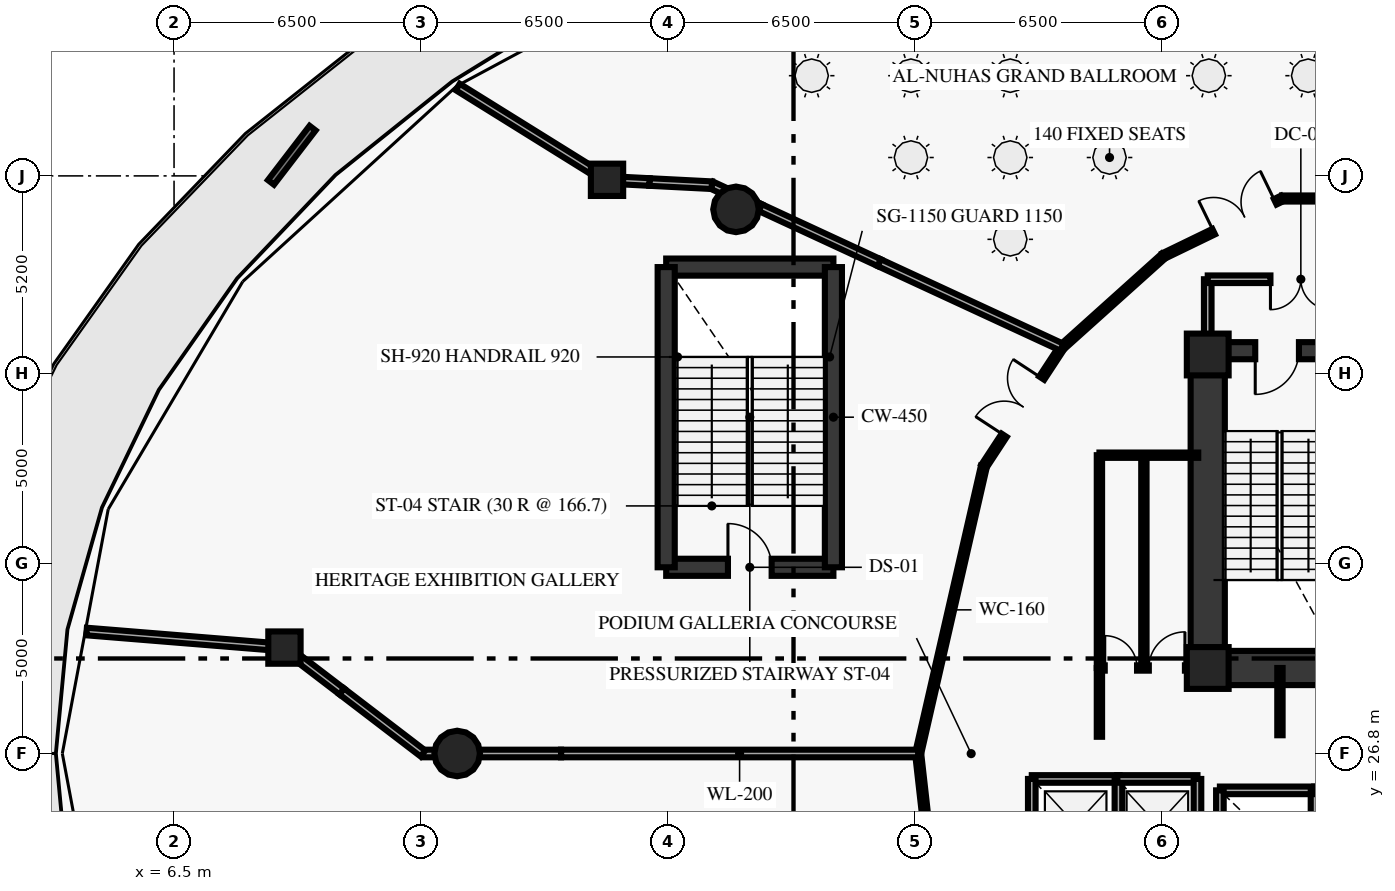
"""IFC4 building model, lengths in metres.
Left out: names, types, materials, properties, quantities, classifications, styles, units other than length and angle.
Written with IfcOpenShell. Run it as: python <this file> out.ifc"""

import sys

from ifc_helpers import new_model, si_unit, direction, frame, frame_2d, origin, origin_2d, place, context, subcontext, project, spatial, rectangle, circle, extrude, element, fill, save


model = new_model("IFC4")
c1 = context("Model", 3, precision=1e-05, world=origin(), true_north=direction((0.0, 1.0)))
c2 = subcontext(c1, "Body", "Model", "MODEL_VIEW")
j1 = project(units=[si_unit("LENGTHUNIT", "METRE"), si_unit("PLANEANGLEUNIT", "RADIAN")], contexts=[c1])
p1 = place(None, origin())
s1 = spatial("IfcSite", under=j1, at=p1, CompositionType="ELEMENT")
p2 = place(p1, origin())
s2 = spatial("IfcBuilding", under=s1, at=p2, CompositionType="ELEMENT")
p3 = place(p2, frame((0.0, 0.0, 11.0)))
s3 = spatial("IfcBuildingStorey", under=s2, at=p3, CompositionType="ELEMENT", Elevation=11.0)
for number, where, z_axis, x_axis in (
    (1, (33.7, 37.3, 0.0), (0.0, 0.0, 1.0), (1.0, 0.0, 0.0)),
    (2, (33.7, 29.05, 0.0), (0.0, 0.0, 1.0), (1.0, 0.0, 0.0)),
):
    element("IfcColumn", number, at=place(p3, frame(where, z_axis=z_axis, x_axis=x_axis)), inside=s3, PredefinedType="PILASTER", context=c2, shape_type="SweptSolid", body=[
        extrude(rectangle(XDim=1.1, YDim=1.1, at=origin_2d()), origin(), (0.0, 0.0, 1.0), 4.7),
    ])
for number, where, z_axis, x_axis in (
    (3, (21.287, 41.119, 0.0), (0.0, 0.0, 1.0), (1.0, 0.0, 0.0)),
    (4, (13.95, 26.8, 0.0), (0.0, 0.0, 1.0), (1.0, 0.0, 0.0)),
):
    element("IfcColumn", number, at=place(p3, frame(where, z_axis=z_axis, x_axis=x_axis)), inside=s3, PredefinedType="COLUMN", context=c2, shape_type="SweptSolid", body=[
        extrude(circle(Radius=0.6, at=origin_2d()), origin(), (0.0, 0.0, 1.0), 4.7),
    ])
for number, where, z_axis, x_axis in (
    (5, (17.893, 41.897, 0.0), (0.0, 0.0, 1.0), (1.0, 0.0, 0.0)),
    (6, (9.405, 29.587, 0.0), (0.0, 0.0, 1.0), (1.0, 0.0, 0.0)),
):
    element("IfcColumn", number, at=place(p3, frame(where, z_axis=z_axis, x_axis=x_axis)), inside=s3, PredefinedType="COLUMN", context=c2, shape_type="SweptSolid", body=[
        extrude(rectangle(XDim=0.85, YDim=0.85, at=origin_2d()), origin(), (0.0, 0.0, 1.0), 4.7),
    ])
p4 = place(p3, frame((33.7, 29.05, 0.0), z_axis=(0.0, 0.0, 1.0), x_axis=(0.0, 1.0, 0.0)))
e7 = element("IfcWall", 7, at=p4, inside=s3, PredefinedType="SHEAR", context=c2, shape_type="SweptSolid", body=[
    extrude(rectangle(XDim=8.35, YDim=0.9, at=frame_2d((4.175, 0.0))), origin(), (0.0, 0.0, 1.0), 4.7),
])
p5 = place(p3, frame((33.7, 29.05, 0.0), z_axis=(0.0, 0.0, 1.0), x_axis=(1.0, 0.0, 0.0)))
e8 = element("IfcWall", 8, at=p5, inside=s3, PredefinedType="SHEAR", context=c2, shape_type="SweptSolid", body=[
    extrude(rectangle(XDim=10.6, YDim=0.9, at=frame_2d((5.3, 0.0))), origin(), (0.0, 0.0, 1.0), 4.7),
])
p6 = place(p3, frame((9.05, 41.829, 0.0), z_axis=(0.0, 0.0, 1.0), x_axis=(0.608838635348, 0.793294091814, 0.0)))
e9 = element("IfcWall", 9, at=p6, inside=s3, PredefinedType="ELEMENTEDWALL", context=c2, shape_type="SweptSolid", body=[
    extrude(rectangle(XDim=1.8, YDim=0.2, at=frame_2d((0.9, 0.0))), origin(), (0.0, 0.0, 1.0), 0.65),
])
p7 = place(p3, frame((37.35, 37.4, 0.0), z_axis=(0.0, 0.0, 1.0), x_axis=(-1.0, 0.0, 0.0)))
e10 = element("IfcWall", 10, at=p7, inside=s3, PredefinedType="SHEAR", context=c2, shape_type="SweptSolid", body=[
    extrude(rectangle(XDim=3.65, YDim=0.45, at=frame_2d((1.825, 0.0))), origin(), (0.0, 0.0, 1.0), 4.7),
])
p8 = place(p7, frame((1.25, 0.0, 0.0)))
e11 = element("IfcOpeningElement", 11, at=p8, cuts=e10, PredefinedType="OPENING", context=c2, shape_type="SweptSolid", body=[
    extrude(rectangle(XDim=1.15, YDim=2.15, at=frame_2d((0.575, 1.075))), frame((0.0, 0.235, 0.0), z_axis=(0.0, -1.0, 0.0), x_axis=(1.0, 0.0, 0.0)), (0.0, 0.0, 1.0), 0.47),
])
p9 = place(p3, frame((19.45, 31.7, 0.0), z_axis=(0.0, 0.0, 1.0), x_axis=(1.0, 0.0, 0.0)))
e12 = element("IfcWall", 12, at=p9, inside=s3, PredefinedType="SHEAR", context=c2, shape_type="SweptSolid", body=[
    extrude(rectangle(XDim=4.4, YDim=0.45, at=frame_2d((2.2, 0.0))), origin(), (0.0, 0.0, 1.0), 4.7),
])
p10 = place(p9, frame((1.625, 0.0, 0.0)))
e13 = element("IfcOpeningElement", 13, at=p10, cuts=e12, PredefinedType="OPENING", context=c2, shape_type="SweptSolid", body=[
    extrude(rectangle(XDim=1.15, YDim=2.15, at=frame_2d((0.575, 1.075))), frame((0.0, 0.235, 0.0), z_axis=(0.0, -1.0, 0.0), x_axis=(1.0, 0.0, 0.0)), (0.0, 0.0, 1.0), 0.47),
])
p11 = place(p3, frame((19.45, 39.6, 0.0), z_axis=(0.0, 0.0, 1.0), x_axis=(1.0, 0.0, 0.0)))
e14 = element("IfcWall", 14, at=p11, inside=s3, PredefinedType="SHEAR", context=c2, shape_type="SweptSolid", body=[
    extrude(rectangle(XDim=4.4, YDim=0.45, at=frame_2d((2.2, 0.0))), origin(), (0.0, 0.0, 1.0), 4.7),
])
for number, where, z_axis, x_axis in (
    (15, (19.45, 31.7, 0.0), (0.0, 0.0, 1.0), (0.0, 1.0, 0.0)),
    (16, (23.85, 31.7, 0.0), (0.0, 0.0, 1.0), (0.0, 1.0, 0.0)),
):
    element("IfcWall", number, at=place(p3, frame(where, z_axis=z_axis, x_axis=x_axis)), inside=s3, PredefinedType="SHEAR", context=c2, shape_type="SweptSolid", body=[
        extrude(rectangle(XDim=7.9, YDim=0.45, at=frame_2d((3.95, 0.0))), origin(), (0.0, 0.0, 1.0), 4.7),
    ])
p12 = place(p3, frame((33.7, 37.4, 0.0), z_axis=(0.0, 0.0, 1.0), x_axis=(0.0, 1.0, 0.0)))
e17 = element("IfcWall", 17, at=p12, inside=s3, PredefinedType="SOLIDWALL", context=c2, shape_type="SweptSolid", body=[
    extrude(rectangle(XDim=1.88, YDim=0.2, at=frame_2d((0.94, 0.0))), origin(), (0.0, 0.0, 1.0), 4.7),
])
p13 = place(p3, frame((38.9, 39.28, 0.0), z_axis=(0.0, 0.0, 1.0), x_axis=(-1.0, 0.0, 0.0)))
e18 = element("IfcWall", 18, at=p13, inside=s3, PredefinedType="SOLIDWALL", context=c2, shape_type="SweptSolid", body=[
    extrude(rectangle(XDim=5.2, YDim=0.2, at=frame_2d((2.6, 0.0))), origin(), (0.0, 0.0, 1.0), 4.7),
])
p14 = place(p13, frame((1.95, 0.0, 0.0)))
e19 = element("IfcOpeningElement", 19, at=p14, cuts=e18, PredefinedType="OPENING", context=c2, shape_type="SweptSolid", body=[
    extrude(rectangle(XDim=1.6, YDim=2.2, at=frame_2d((0.8, 1.1))), frame((0.0, 0.11, 0.0), z_axis=(0.0, -1.0, 0.0), x_axis=(1.0, 0.0, 0.0)), (0.0, 0.0, 1.0), 0.22),
])
p15 = place(p3, frame((35.6, 27.28, 0.0), z_axis=(0.0, 0.0, 1.0), x_axis=(0.0, 1.0, 0.0)))
e20 = element("IfcWall", 20, at=p15, inside=s3, PredefinedType="PARTITIONING", context=c2, shape_type="SweptSolid", body=[
    extrude(rectangle(XDim=1.77, YDim=0.14, at=frame_2d((0.885, 0.0))), origin(), (0.0, 0.0, 1.0), 4.7),
])
p16 = place(p3, frame((29.07, 26.13, 0.0), z_axis=(0.0, 0.0, 1.0), x_axis=(1.0, 0.0, 0.0)))
e21 = element("IfcWall", 21, at=p16, inside=s3, PredefinedType="SOLIDWALL", context=c2, shape_type="SweptSolid", body=[
    extrude(rectangle(XDim=2.31, YDim=0.2, at=frame_2d((1.155, 0.0))), origin(), (0.0, 0.0, 1.0), 4.7),
])
for number, where, z_axis, x_axis in (
    (22, (29.07, 23.72, 0.0), (0.0, 0.0, 1.0), (0.0, 1.0, 0.0)),
    (23, (31.35, 23.72, 0.0), (0.0, 0.0, 1.0), (0.0, 1.0, 0.0)),
):
    element("IfcWall", number, at=place(p3, frame(where, z_axis=z_axis, x_axis=x_axis)), inside=s3, PredefinedType="SOLIDWALL", context=c2, shape_type="SweptSolid", body=[
        extrude(rectangle(XDim=2.41, YDim=0.2, at=frame_2d((1.205, 0.0))), origin(), (0.0, 0.0, 1.0), 4.7),
    ])
p17 = place(p3, frame((31.32, 26.13, 0.0), z_axis=(0.0, 0.0, 1.0), x_axis=(1.0, 0.0, 0.0)))
e24 = element("IfcWall", 24, at=p17, inside=s3, PredefinedType="SOLIDWALL", context=c2, shape_type="SweptSolid", body=[
    extrude(rectangle(XDim=2.11, YDim=0.2, at=frame_2d((1.055, 0.0))), origin(), (0.0, 0.0, 1.0), 4.7),
])
p18 = place(p3, frame((33.43, 23.72, 0.0), z_axis=(0.0, 0.0, 1.0), x_axis=(0.0, 1.0, 0.0)))
e25 = element("IfcWall", 25, at=p18, inside=s3, PredefinedType="SOLIDWALL", context=c2, shape_type="SweptSolid", body=[
    extrude(rectangle(XDim=2.41, YDim=0.2, at=frame_2d((1.205, 0.0))), origin(), (0.0, 0.0, 1.0), 4.7),
])
p19 = place(p3, frame((34.02, 25.83, 0.0), z_axis=(0.0, 0.0, 1.0), x_axis=(1.0, 0.0, 0.0)))
e26 = element("IfcWall", 26, at=p19, inside=s3, PredefinedType="SOLIDWALL", context=c2, shape_type="SweptSolid", body=[
    extrude(rectangle(XDim=2.5, YDim=0.2, at=frame_2d((1.25, 0.0))), origin(), (0.0, 0.0, 1.0), 4.7),
])
for number, where, z_axis, x_axis in (
    (27, (34.02, 23.42, 0.0), (0.0, 0.0, 1.0), (0.0, 1.0, 0.0)),
    (28, (36.51, 23.42, 0.0), (0.0, 0.0, 1.0), (0.0, 1.0, 0.0)),
):
    element("IfcWall", number, at=place(p3, frame(where, z_axis=z_axis, x_axis=x_axis)), inside=s3, PredefinedType="SOLIDWALL", context=c2, shape_type="SweptSolid", body=[
        extrude(rectangle(XDim=2.41, YDim=0.2, at=frame_2d((1.205, 0.0))), origin(), (0.0, 0.0, 1.0), 4.7),
    ])
p20 = place(p3, frame((36.5, 25.83, 0.0), z_axis=(0.0, 0.0, 1.0), x_axis=(1.0, 0.0, 0.0)))
e29 = element("IfcWall", 29, at=p20, inside=s3, PredefinedType="SOLIDWALL", context=c2, shape_type="SweptSolid", body=[
    extrude(rectangle(XDim=2.5, YDim=0.2, at=frame_2d((1.25, 0.0))), origin(), (0.0, 0.0, 1.0), 4.7),
])
p21 = place(p3, frame((30.85, 27.24, 0.0), z_axis=(0.0, 0.0, 1.0), x_axis=(0.0, 1.0, 0.0)))
e30 = element("IfcWall", 30, at=p21, inside=s3, PredefinedType="PARTITIONING", context=c2, shape_type="SweptSolid", body=[
    extrude(rectangle(XDim=1.81, YDim=0.14, at=frame_2d((0.905, 0.0))), origin(), (0.0, 0.0, 1.0), 4.7),
])
p22 = place(p3, frame((30.85, 29.05, 0.0), z_axis=(0.0, 0.0, 1.0), x_axis=(1.0, 0.0, 0.0)))
e31 = element("IfcWall", 31, at=p22, inside=s3, PredefinedType="PARTITIONING", context=c2, shape_type="SweptSolid", body=[
    extrude(rectangle(XDim=2.43, YDim=0.14, at=frame_2d((1.215, 0.0))), origin(), (0.0, 0.0, 1.0), 3.66),
])
p23 = place(p22, frame((0.14, 0.0, 0.0)))
e32 = element("IfcOpeningElement", 32, at=p23, cuts=e31, PredefinedType="OPENING", context=c2, shape_type="SweptSolid", body=[
    extrude(rectangle(XDim=0.85, YDim=2.1, at=frame_2d((0.425, 1.05))), frame((0.0, 0.08, 0.0), z_axis=(0.0, -1.0, 0.0), x_axis=(1.0, 0.0, 0.0)), (0.0, 0.0, 1.0), 0.16),
])
p24 = place(p22, frame((1.3, 0.0, 0.0)))
e33 = element("IfcOpeningElement", 33, at=p24, cuts=e31, PredefinedType="OPENING", context=c2, shape_type="SweptSolid", body=[
    extrude(rectangle(XDim=0.95, YDim=2.1, at=frame_2d((0.475, 1.05))), frame((0.0, 0.08, 0.0), z_axis=(0.0, -1.0, 0.0), x_axis=(1.0, 0.0, 0.0)), (0.0, 0.0, 1.0), 0.16),
])
p25 = place(p3, frame((32.02, 29.05, 0.0), z_axis=(0.0, 0.0, 1.0), x_axis=(0.0, 1.0, 0.0)))
e34 = element("IfcWall", 34, at=p25, inside=s3, PredefinedType="PARTITIONING", context=c2, shape_type="SweptSolid", body=[
    extrude(rectangle(XDim=5.6, YDim=0.14, at=frame_2d((2.8, 0.0))), origin(), (0.0, 0.0, 1.0), 4.7),
])
p26 = place(p3, frame((30.85, 34.65, 0.0), z_axis=(0.0, 0.0, 1.0), x_axis=(1.0, 0.0, 0.0)))
e35 = element("IfcWall", 35, at=p26, inside=s3, PredefinedType="PARTITIONING", context=c2, shape_type="SweptSolid", body=[
    extrude(rectangle(XDim=2.6, YDim=0.14, at=frame_2d((1.3, 0.0))), origin(), (0.0, 0.0, 1.0), 4.7),
])
p27 = place(p3, frame((30.85, 29.05, 0.0), z_axis=(0.0, 0.0, 1.0), x_axis=(0.0, 1.0, 0.0)))
e36 = element("IfcWall", 36, at=p27, inside=s3, PredefinedType="PARTITIONING", context=c2, shape_type="SweptSolid", body=[
    extrude(rectangle(XDim=5.6, YDim=0.14, at=frame_2d((2.8, 0.0))), origin(), (0.0, 0.0, 1.0), 4.7),
])
p28 = place(p3, frame((42.344, 41.405, 0.0), z_axis=(0.0, 0.0, 1.0), x_axis=(-1.0, 0.0, 0.0)))
e37 = element("IfcWall", 37, at=p28, inside=s3, PredefinedType="PARTITIONING", context=c2, shape_type="SweptSolid", body=[
    extrude(rectangle(XDim=6.688, YDim=0.16, at=frame_2d((3.344, 0.0))), origin(), (0.0, 0.0, 1.0), 4.7),
])
p29 = place(p3, frame((32.54, 39.894, 0.0), z_axis=(0.0, 0.0, 1.0), x_axis=(0.899789784655, 0.436323668199, 0.0)))
e38 = element("IfcWall", 38, at=p29, inside=s3, PredefinedType="PARTITIONING", context=c2, shape_type="SweptSolid", body=[
    extrude(rectangle(XDim=3.463, YDim=0.16, at=frame_2d((1.731, 0.0))), origin(), (0.0, 0.0, 1.0), 4.7),
])
p30 = place(p29, frame((1.463, 0.0, 0.0)))
e39 = element("IfcOpeningElement", 39, at=p30, cuts=e38, PredefinedType="OPENING", context=c2, shape_type="SweptSolid", body=[
    extrude(rectangle(XDim=1.8, YDim=2.3, at=frame_2d((0.9, 1.15))), frame((0.0, 0.09, 0.0), z_axis=(0.0, -1.0, 0.0), x_axis=(1.0, 0.0, 0.0)), (0.0, 0.0, 1.0), 0.18),
])
p31 = place(p3, frame((32.54, 39.894, 0.0), z_axis=(0.0, 0.0, 1.0), x_axis=(-0.744032872127, -0.668143012531, 0.0)))
e40 = element("IfcWall", 40, at=p31, inside=s3, PredefinedType="PARTITIONING", context=c2, shape_type="SweptSolid", body=[
    extrude(rectangle(XDim=3.597, YDim=0.16, at=frame_2d((1.798, 0.0))), origin(), (0.0, 0.0, 1.0), 4.7),
])
p32 = place(p3, frame((27.811, 34.36, 0.0), z_axis=(0.0, 0.0, 1.0), x_axis=(0.548348738977, 0.836249759619, 0.0)))
e41 = element("IfcWall", 41, at=p32, inside=s3, PredefinedType="PARTITIONING", context=c2, shape_type="SweptSolid", body=[
    extrude(rectangle(XDim=3.744, YDim=0.16, at=frame_2d((1.872, 0.0))), origin(), (0.0, 0.0, 1.0), 4.7),
])
p33 = place(p32, frame((0.972, 0.0, 0.0)))
e42 = element("IfcOpeningElement", 42, at=p33, cuts=e41, PredefinedType="OPENING", context=c2, shape_type="SweptSolid", body=[
    extrude(rectangle(XDim=1.8, YDim=2.3, at=frame_2d((0.9, 1.15))), frame((0.0, 0.09, 0.0), z_axis=(0.0, -1.0, 0.0), x_axis=(1.0, 0.0, 0.0)), (0.0, 0.0, 1.0), 0.18),
])
p34 = place(p3, frame((27.811, 34.36, 0.0), z_axis=(0.0, 0.0, 1.0), x_axis=(-0.223185487206, -0.974775993909, 0.0)))
e43 = element("IfcWall", 43, at=p34, inside=s3, PredefinedType="PARTITIONING", context=c2, shape_type="SweptSolid", body=[
    extrude(rectangle(XDim=7.756, YDim=0.16, at=frame_2d((3.878, 0.0))), origin(), (0.0, 0.0, 1.0), 4.7),
])
p35 = place(p3, frame((26.08, 26.8, 0.0), z_axis=(0.0, 0.0, 1.0), x_axis=(0.111724363671, -0.99373923469, 0.0)))
e44 = element("IfcWall", 44, at=p35, inside=s3, PredefinedType="PARTITIONING", context=c2, shape_type="SweptSolid", body=[
    extrude(rectangle(XDim=3.938, YDim=0.16, at=frame_2d((1.969, 0.0))), origin(), (0.0, 0.0, 1.0), 4.7),
])
p36 = place(p3, frame((29.864, 37.491, 0.0), z_axis=(0.0, 0.0, 1.0), x_axis=(-0.907524785669, 0.419998527851, 0.0)))
e45 = element("IfcWall", 45, at=p36, inside=s3, PredefinedType="PARTITIONING", context=c2, shape_type="SweptSolid", body=[
    extrude(rectangle(XDim=5.3, YDim=0.2, at=frame_2d((2.65, 0.0))), origin(), (0.0, 0.0, 1.0), 4.7),
])
p37 = place(p3, frame((25.054, 39.717, 0.0), z_axis=(0.0, 0.0, 1.0), x_axis=(-0.90747190463, 0.420112773321, 0.0)))
e46 = element("IfcWall", 46, at=p37, inside=s3, PredefinedType="PARTITIONING", context=c2, shape_type="SweptSolid", body=[
    extrude(rectangle(XDim=3.449, YDim=0.2, at=frame_2d((1.725, 0.0))), origin(), (0.0, 0.0, 1.0), 3.92),
])
p38 = place(p3, frame((21.924, 41.166, 0.0), z_axis=(0.0, 0.0, 1.0), x_axis=(-0.907622896373, 0.419786467124, 0.0)))
e47 = element("IfcWall", 47, at=p38, inside=s3, PredefinedType="PARTITIONING", context=c2, shape_type="SweptSolid", body=[
    extrude(rectangle(XDim=1.403, YDim=0.2, at=frame_2d((0.701, 0.0))), origin(), (0.0, 0.0, 1.0), 4.7),
])
p39 = place(p3, frame((20.651, 41.755, 0.0), z_axis=(0.0, 0.0, 1.0), x_axis=(-0.998685128887, 0.051264152576, 0.0)))
e48 = element("IfcWall", 48, at=p39, inside=s3, PredefinedType="PARTITIONING", context=c2, shape_type="SweptSolid", body=[
    extrude(rectangle(XDim=1.643, YDim=0.2, at=frame_2d((0.822, 0.0))), origin(), (0.0, 0.0, 1.0), 4.7),
])
p40 = place(p3, frame((19.01, 41.839, 0.0), z_axis=(0.0, 0.0, 1.0), x_axis=(-0.998660904733, 0.051733909163, 0.0)))
e49 = element("IfcWall", 49, at=p40, inside=s3, PredefinedType="PARTITIONING", context=c2, shape_type="SweptSolid", body=[
    extrude(rectangle(XDim=1.118, YDim=0.2, at=frame_2d((0.559, 0.0))), origin(), (0.0, 0.0, 1.0), 4.24),
])
p41 = place(p3, frame((17.893, 41.897, 0.0), z_axis=(0.0, 0.0, 1.0), x_axis=(-0.849149708827, 0.528152224267, 0.0)))
e50 = element("IfcWall", 50, at=p41, inside=s3, PredefinedType="PARTITIONING", context=c2, shape_type="SweptSolid", body=[
    extrude(rectangle(XDim=4.626, YDim=0.2, at=frame_2d((2.313, 0.0))), origin(), (0.0, 0.0, 1.0), 4.7),
])
p42 = place(p3, frame((26.08, 26.8, 0.0), z_axis=(0.0, 0.0, 1.0), x_axis=(-1.0, 0.0, 0.0)))
e51 = element("IfcWall", 51, at=p42, inside=s3, PredefinedType="SOLIDWALL", context=c2, shape_type="SweptSolid", body=[
    extrude(rectangle(XDim=9.397, YDim=0.2, at=frame_2d((4.698, 0.0))), origin(), (0.0, 0.0, 1.0), 4.7),
])
p43 = place(p3, frame((16.683, 26.8, 0.0), z_axis=(0.0, 0.0, 1.0), x_axis=(-1.0, 0.0, 0.0)))
e52 = element("IfcWall", 52, at=p43, inside=s3, PredefinedType="SOLIDWALL", context=c2, shape_type="SweptSolid", body=[
    extrude(rectangle(XDim=2.744, YDim=0.2, at=frame_2d((1.372, 0.0))), origin(), (0.0, 0.0, 1.0), 3.66),
])
p44 = place(p3, frame((13.939, 26.8, 0.0), z_axis=(0.0, 0.0, 1.0), x_axis=(-1.0, 0.0, 0.0)))
e53 = element("IfcWall", 53, at=p44, inside=s3, PredefinedType="SOLIDWALL", context=c2, shape_type="SweptSolid", body=[
    extrude(rectangle(XDim=0.889, YDim=0.2, at=frame_2d((0.444, 0.0))), origin(), (0.0, 0.0, 1.0), 4.7),
])
p45 = place(p3, frame((13.05, 26.8, 0.0), z_axis=(0.0, 0.0, 1.0), x_axis=(-0.794337234882, 0.607477042595, 0.0)))
e54 = element("IfcWall", 54, at=p45, inside=s3, PredefinedType="SOLIDWALL", context=c2, shape_type="SweptSolid", body=[
    extrude(rectangle(XDim=2.691, YDim=0.2, at=frame_2d((1.346, 0.0))), origin(), (0.0, 0.0, 1.0), 4.7),
])
p46 = place(p3, frame((10.912, 28.435, 0.0), z_axis=(0.0, 0.0, 1.0), x_axis=(-0.794514897702, 0.607244660191, 0.0)))
e55 = element("IfcWall", 55, at=p46, inside=s3, PredefinedType="SOLIDWALL", context=c2, shape_type="SweptSolid", body=[
    extrude(rectangle(XDim=1.897, YDim=0.2, at=frame_2d((0.948, 0.0))), origin(), (0.0, 0.0, 1.0), 4.24),
])
p47 = place(p3, frame((9.405, 29.587, 0.0), z_axis=(0.0, 0.0, 1.0), x_axis=(-0.996715094871, 0.080987774729, 0.0)))
e56 = element("IfcWall", 56, at=p47, inside=s3, PredefinedType="SOLIDWALL", context=c2, shape_type="SweptSolid", body=[
    extrude(rectangle(XDim=5.224, YDim=0.2, at=frame_2d((2.612, 0.0))), origin(), (0.0, 0.0, 1.0), 4.7),
])
p48 = place(p8, origin())
e57 = element("IfcDoor", 57, at=p48, inside=s3, OperationType="SINGLE_SWING_RIGHT", PredefinedType="DOOR", context=c2, shape_type="SweptSolid", body=[
    extrude(rectangle(XDim=1.15, YDim=2.15, at=frame_2d((0.575, 1.075))), frame((0.0, 0.025, 0.0), z_axis=(0.0, -1.0, 0.0), x_axis=(1.0, 0.0, 0.0)), (0.0, 0.0, 1.0), 0.05),
])
fill(e11, e57)
p49 = place(p10, origin())
e58 = element("IfcDoor", 58, at=p49, inside=s3, OperationType="SINGLE_SWING_LEFT", PredefinedType="DOOR", context=c2, shape_type="SweptSolid", body=[
    extrude(rectangle(XDim=1.15, YDim=2.15, at=frame_2d((0.575, 1.075))), frame((0.0, 0.025, 0.0), z_axis=(0.0, -1.0, 0.0), x_axis=(1.0, 0.0, 0.0)), (0.0, 0.0, 1.0), 0.05),
])
fill(e13, e58)
p50 = place(p14, origin())
e59 = element("IfcDoor", 59, at=p50, inside=s3, OperationType="DOUBLE_DOOR_SINGLE_SWING", PredefinedType="DOOR", context=c2, shape_type="SweptSolid", body=[
    extrude(rectangle(XDim=1.6, YDim=2.2, at=frame_2d((0.8, 1.1))), frame((0.0, 0.025, 0.0), z_axis=(0.0, -1.0, 0.0), x_axis=(1.0, 0.0, 0.0)), (0.0, 0.0, 1.0), 0.05),
])
fill(e19, e59)
p51 = place(p23, origin())
e60 = element("IfcDoor", 60, at=p51, inside=s3, OperationType="SINGLE_SWING_LEFT", PredefinedType="DOOR", context=c2, shape_type="SweptSolid", body=[
    extrude(rectangle(XDim=0.85, YDim=2.1, at=frame_2d((0.425, 1.05))), frame((0.0, 0.025, 0.0), z_axis=(0.0, -1.0, 0.0), x_axis=(1.0, 0.0, 0.0)), (0.0, 0.0, 1.0), 0.05),
])
fill(e32, e60)
p52 = place(p24, origin())
e61 = element("IfcDoor", 61, at=p52, inside=s3, OperationType="SINGLE_SWING_RIGHT", PredefinedType="DOOR", context=c2, shape_type="SweptSolid", body=[
    extrude(rectangle(XDim=0.95, YDim=2.1, at=frame_2d((0.475, 1.05))), frame((0.0, 0.025, 0.0), z_axis=(0.0, -1.0, 0.0), x_axis=(1.0, 0.0, 0.0)), (0.0, 0.0, 1.0), 0.05),
])
fill(e33, e61)
p53 = place(p30, origin())
e62 = element("IfcDoor", 62, at=p53, inside=s3, OperationType="DOUBLE_DOOR_SINGLE_SWING", PredefinedType="DOOR", context=c2, shape_type="SweptSolid", body=[
    extrude(rectangle(XDim=1.8, YDim=2.3, at=frame_2d((0.9, 1.15))), frame((0.0, 0.025, 0.0), z_axis=(0.0, -1.0, 0.0), x_axis=(1.0, 0.0, 0.0)), (0.0, 0.0, 1.0), 0.05),
])
fill(e39, e62)
p54 = place(p33, origin())
e63 = element("IfcDoor", 63, at=p54, inside=s3, OperationType="DOUBLE_DOOR_SINGLE_SWING", PredefinedType="DOOR", context=c2, shape_type="SweptSolid", body=[
    extrude(rectangle(XDim=1.8, YDim=2.3, at=frame_2d((0.9, 1.15))), frame((0.0, 0.025, 0.0), z_axis=(0.0, -1.0, 0.0), x_axis=(1.0, 0.0, 0.0)), (0.0, 0.0, 1.0), 0.05),
])
fill(e42, e63)
save(model, sys.argv[1])
